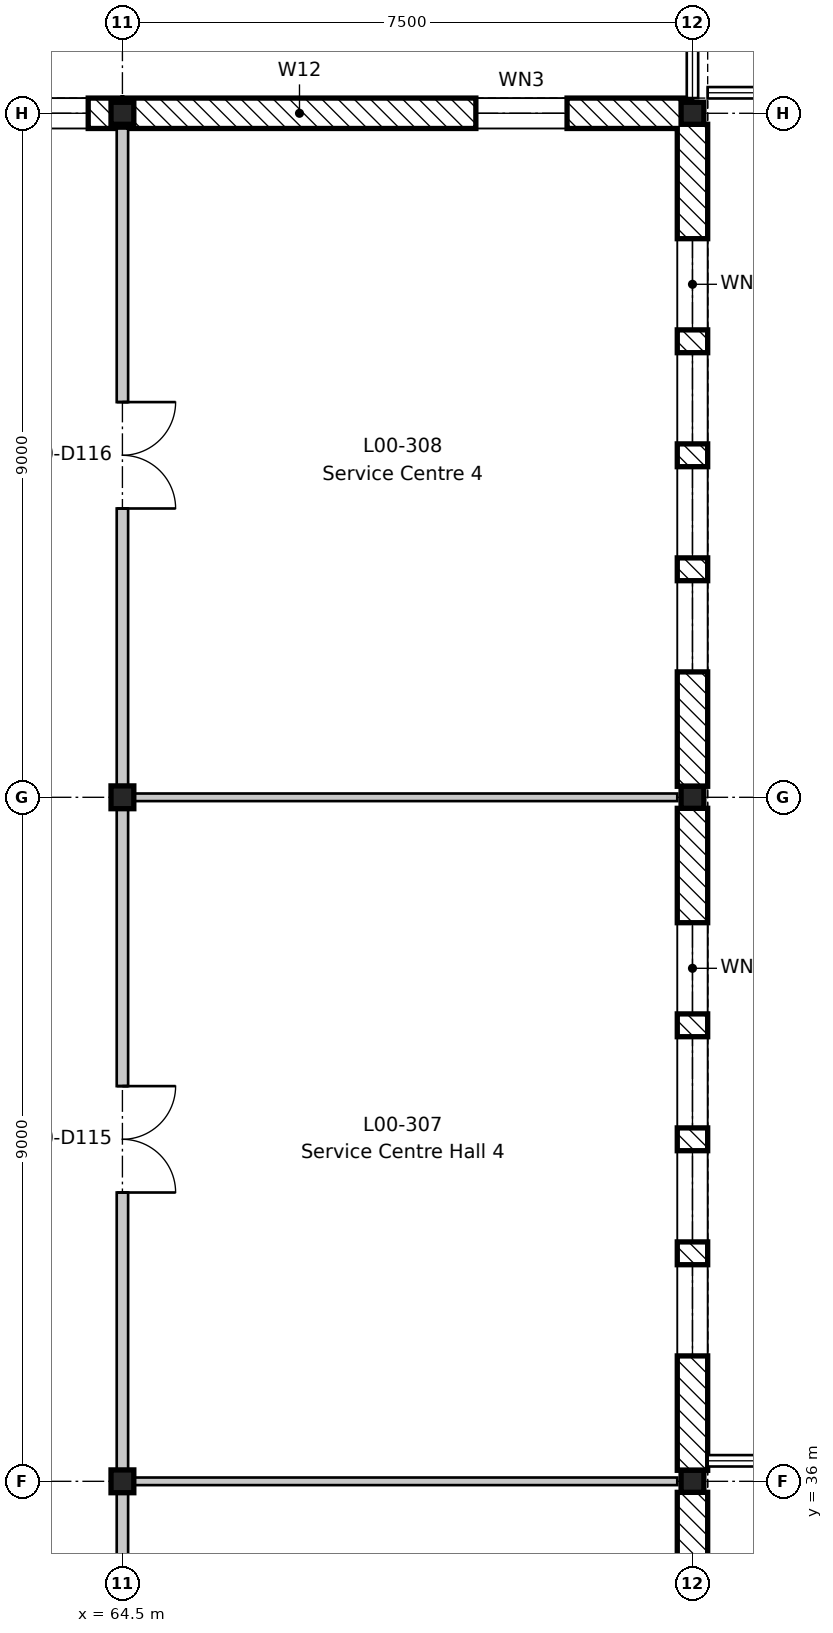
"""IFC4 building model, lengths in metres.
Left out: names, types, materials, properties, quantities, classifications, styles, units other than length and angle.
Written with IfcOpenShell. Run it as: python <this file> out.ifc"""

import sys

from ifc_helpers import new_model, si_unit, direction, frame, frame_2d, origin, origin_2d, place, context, subcontext, project, spatial, rectangle, i_section, extrude, element, fill, save


model = new_model("IFC4")
c1 = context("Model", 3, precision=1e-05, world=origin(), true_north=direction((0.0, 1.0)))
c2 = subcontext(c1, "Body", "Model", "MODEL_VIEW")
j1 = project(units=[si_unit("LENGTHUNIT", "METRE"), si_unit("PLANEANGLEUNIT", "RADIAN")], contexts=[c1])
p1 = place(None, origin())
s1 = spatial("IfcSite", under=j1, at=p1, CompositionType="ELEMENT")
p2 = place(p1, origin())
s2 = spatial("IfcBuilding", under=s1, at=p2, CompositionType="ELEMENT")
p3 = place(p2, origin())
s3 = spatial("IfcBuildingStorey", under=s2, at=p3, CompositionType="ELEMENT", Elevation=0.0)
for number, where, z_axis, x_axis in (
    (1, (64.5, 36.0, -0.6), (0.0, 0.0, 1.0), (1.0, 0.0, 0.0)),
    (2, (64.5, 45.0, -0.6), (0.0, 0.0, 1.0), (1.0, 0.0, 0.0)),
):
    element("IfcColumn", number, at=place(p3, frame(where, z_axis=z_axis, x_axis=x_axis)), inside=s3, PredefinedType="COLUMN", context=c2, shape_type="SweptSolid", body=[
        extrude(i_section(OverallWidth=0.3, OverallDepth=0.3, WebThickness=0.011, FlangeThickness=0.019, FilletRadius=0.027, at=origin_2d()), origin(), (0.0, 0.0, 1.0), 5.8),
    ])
for number, where, z_axis, x_axis in (
    (3, (64.5, 54.0, -0.6), (0.0, 0.0, 1.0), (1.0, 0.0, 0.0)),
    (4, (72.0, 36.0, -0.6), (0.0, 0.0, 1.0), (1.0, 0.0, 0.0)),
    (5, (72.0, 45.0, -0.6), (0.0, 0.0, 1.0), (1.0, 0.0, 0.0)),
    (6, (72.0, 54.0, -0.6), (0.0, 0.0, 1.0), (1.0, 0.0, 0.0)),
):
    element("IfcColumn", number, at=place(p3, frame(where, z_axis=z_axis, x_axis=x_axis)), inside=s3, PredefinedType="COLUMN", context=c2, shape_type="SweptSolid", body=[
        extrude(i_section(OverallWidth=0.3, OverallDepth=0.29, WebThickness=0.009, FlangeThickness=0.014, FilletRadius=0.027, at=origin_2d()), origin(), (0.0, 0.0, 1.0), 5.8),
    ])
p4 = place(p3, frame((61.509, 54.0, 0.0), z_axis=(0.0, 0.0, 1.0), x_axis=(1.0, 0.0, 0.0)))
e7 = element("IfcWall", 7, at=p4, inside=s3, PredefinedType="STANDARD", context=c2, shape_type="SweptSolid", body=[
    extrude(rectangle(XDim=2.981, YDim=0.4, at=frame_2d((1.491, 0.0))), origin(), (0.0, 0.0, 1.0), 5.0),
])
p5 = place(p4, frame((0.441, 0.0, 0.9)))
e8 = element("IfcOpeningElement", 8, at=p5, cuts=e7, PredefinedType="OPENING", context=c2, shape_type="SweptSolid", body=[
    extrude(rectangle(XDim=2.1, YDim=2.1, at=frame_2d((1.05, 1.05))), frame((0.0, 0.21, 0.0), z_axis=(0.0, -1.0, 0.0), x_axis=(1.0, 0.0, 0.0)), (0.0, 0.0, 1.0), 0.42),
])
p6 = place(p3, frame((64.509, 54.0, 0.0), z_axis=(0.0, 0.0, 1.0), x_axis=(1.0, 0.0, 0.0)))
e9 = element("IfcWall", 9, at=p6, inside=s3, PredefinedType="STANDARD", context=c2, shape_type="SweptSolid", body=[
    extrude(rectangle(XDim=7.481, YDim=0.4, at=frame_2d((3.741, 0.0))), origin(), (0.0, 0.0, 1.0), 4.87),
])
p7 = place(p6, frame((4.641, 0.0, 0.6)))
e10 = element("IfcOpeningElement", 10, at=p7, cuts=e9, PredefinedType="OPENING", context=c2, shape_type="SweptSolid", body=[
    extrude(rectangle(XDim=1.2, YDim=3.9, at=frame_2d((0.6, 1.95))), frame((0.0, 0.21, 0.0), z_axis=(0.0, -1.0, 0.0), x_axis=(1.0, 0.0, 0.0)), (0.0, 0.0, 1.0), 0.42),
])
p8 = place(p3, frame((72.0, 35.855, 0.0), z_axis=(0.0, 0.0, 1.0), x_axis=(0.0, -1.0, 0.0)))
e11 = element("IfcWall", 11, at=p8, inside=s3, PredefinedType="STANDARD", context=c2, shape_type="SweptSolid", body=[
    extrude(rectangle(XDim=8.71, YDim=0.4, at=frame_2d((4.355, 0.0))), origin(), (0.0, 0.0, 1.0), 4.8),
])
p9 = place(p8, frame((6.005, 0.0, 0.6)))
e12 = element("IfcOpeningElement", 12, at=p9, cuts=e11, PredefinedType="OPENING", context=c2, shape_type="SweptSolid", body=[
    extrude(rectangle(XDim=1.2, YDim=3.9, at=frame_2d((0.6, 1.95))), frame((0.0, 0.21, 0.0), z_axis=(0.0, -1.0, 0.0), x_axis=(1.0, 0.0, 0.0)), (0.0, 0.0, 1.0), 0.42),
])
p10 = place(p8, frame((4.505, 0.0, 0.6)))
e13 = element("IfcOpeningElement", 13, at=p10, cuts=e11, PredefinedType="OPENING", context=c2, shape_type="SweptSolid", body=[
    extrude(rectangle(XDim=1.2, YDim=3.9, at=frame_2d((0.6, 1.95))), frame((0.0, 0.21, 0.0), z_axis=(0.0, -1.0, 0.0), x_axis=(1.0, 0.0, 0.0)), (0.0, 0.0, 1.0), 0.42),
])
p11 = place(p8, frame((3.005, 0.0, 0.6)))
e14 = element("IfcOpeningElement", 14, at=p11, cuts=e11, PredefinedType="OPENING", context=c2, shape_type="SweptSolid", body=[
    extrude(rectangle(XDim=1.2, YDim=3.9, at=frame_2d((0.6, 1.95))), frame((0.0, 0.21, 0.0), z_axis=(0.0, -1.0, 0.0), x_axis=(1.0, 0.0, 0.0)), (0.0, 0.0, 1.0), 0.42),
])
p12 = place(p8, frame((1.505, 0.0, 0.6)))
e15 = element("IfcOpeningElement", 15, at=p12, cuts=e11, PredefinedType="OPENING", context=c2, shape_type="SweptSolid", body=[
    extrude(rectangle(XDim=1.2, YDim=3.9, at=frame_2d((0.6, 1.95))), frame((0.0, 0.21, 0.0), z_axis=(0.0, -1.0, 0.0), x_axis=(1.0, 0.0, 0.0)), (0.0, 0.0, 1.0), 0.42),
])
p13 = place(p3, frame((72.0, 44.855, 0.0), z_axis=(0.0, 0.0, 1.0), x_axis=(0.0, -1.0, 0.0)))
e16 = element("IfcWall", 16, at=p13, inside=s3, PredefinedType="STANDARD", context=c2, shape_type="SweptSolid", body=[
    extrude(rectangle(XDim=8.71, YDim=0.4, at=frame_2d((4.355, 0.0))), origin(), (0.0, 0.0, 1.0), 4.8),
])
p14 = place(p13, frame((6.005, 0.0, 0.6)))
e17 = element("IfcOpeningElement", 17, at=p14, cuts=e16, PredefinedType="OPENING", context=c2, shape_type="SweptSolid", body=[
    extrude(rectangle(XDim=1.2, YDim=3.9, at=frame_2d((0.6, 1.95))), frame((0.0, 0.21, 0.0), z_axis=(0.0, -1.0, 0.0), x_axis=(1.0, 0.0, 0.0)), (0.0, 0.0, 1.0), 0.42),
])
p15 = place(p13, frame((4.505, 0.0, 0.6)))
e18 = element("IfcOpeningElement", 18, at=p15, cuts=e16, PredefinedType="OPENING", context=c2, shape_type="SweptSolid", body=[
    extrude(rectangle(XDim=1.2, YDim=3.9, at=frame_2d((0.6, 1.95))), frame((0.0, 0.21, 0.0), z_axis=(0.0, -1.0, 0.0), x_axis=(1.0, 0.0, 0.0)), (0.0, 0.0, 1.0), 0.42),
])
p16 = place(p13, frame((3.005, 0.0, 0.6)))
e19 = element("IfcOpeningElement", 19, at=p16, cuts=e16, PredefinedType="OPENING", context=c2, shape_type="SweptSolid", body=[
    extrude(rectangle(XDim=1.2, YDim=3.9, at=frame_2d((0.6, 1.95))), frame((0.0, 0.21, 0.0), z_axis=(0.0, -1.0, 0.0), x_axis=(1.0, 0.0, 0.0)), (0.0, 0.0, 1.0), 0.42),
])
p17 = place(p13, frame((1.505, 0.0, 0.6)))
e20 = element("IfcOpeningElement", 20, at=p17, cuts=e16, PredefinedType="OPENING", context=c2, shape_type="SweptSolid", body=[
    extrude(rectangle(XDim=1.2, YDim=3.9, at=frame_2d((0.6, 1.95))), frame((0.0, 0.21, 0.0), z_axis=(0.0, -1.0, 0.0), x_axis=(1.0, 0.0, 0.0)), (0.0, 0.0, 1.0), 0.42),
])
p18 = place(p3, frame((72.0, 53.855, 0.0), z_axis=(0.0, 0.0, 1.0), x_axis=(0.0, -1.0, 0.0)))
e21 = element("IfcWall", 21, at=p18, inside=s3, PredefinedType="STANDARD", context=c2, shape_type="SweptSolid", body=[
    extrude(rectangle(XDim=8.71, YDim=0.4, at=frame_2d((4.355, 0.0))), origin(), (0.0, 0.0, 1.0), 4.8),
])
p19 = place(p18, frame((6.005, 0.0, 0.6)))
e22 = element("IfcOpeningElement", 22, at=p19, cuts=e21, PredefinedType="OPENING", context=c2, shape_type="SweptSolid", body=[
    extrude(rectangle(XDim=1.2, YDim=3.9, at=frame_2d((0.6, 1.95))), frame((0.0, 0.21, 0.0), z_axis=(0.0, -1.0, 0.0), x_axis=(1.0, 0.0, 0.0)), (0.0, 0.0, 1.0), 0.42),
])
p20 = place(p18, frame((4.505, 0.0, 0.6)))
e23 = element("IfcOpeningElement", 23, at=p20, cuts=e21, PredefinedType="OPENING", context=c2, shape_type="SweptSolid", body=[
    extrude(rectangle(XDim=1.2, YDim=3.9, at=frame_2d((0.6, 1.95))), frame((0.0, 0.21, 0.0), z_axis=(0.0, -1.0, 0.0), x_axis=(1.0, 0.0, 0.0)), (0.0, 0.0, 1.0), 0.42),
])
p21 = place(p18, frame((3.005, 0.0, 0.6)))
e24 = element("IfcOpeningElement", 24, at=p21, cuts=e21, PredefinedType="OPENING", context=c2, shape_type="SweptSolid", body=[
    extrude(rectangle(XDim=1.2, YDim=3.9, at=frame_2d((0.6, 1.95))), frame((0.0, 0.21, 0.0), z_axis=(0.0, -1.0, 0.0), x_axis=(1.0, 0.0, 0.0)), (0.0, 0.0, 1.0), 0.42),
])
p22 = place(p18, frame((1.505, 0.0, 0.6)))
e25 = element("IfcOpeningElement", 25, at=p22, cuts=e21, PredefinedType="OPENING", context=c2, shape_type="SweptSolid", body=[
    extrude(rectangle(XDim=1.2, YDim=3.9, at=frame_2d((0.6, 1.95))), frame((0.0, 0.21, 0.0), z_axis=(0.0, -1.0, 0.0), x_axis=(1.0, 0.0, 0.0)), (0.0, 0.0, 1.0), 0.42),
])
for number, where, z_axis, x_axis in (
    (26, (64.575, 36.0, 0.0), (0.0, 0.0, 1.0), (1.0, 0.0, 0.0)),
    (27, (64.575, 45.0, 0.0), (0.0, 0.0, 1.0), (1.0, 0.0, 0.0)),
):
    element("IfcWall", number, at=place(p3, frame(where, z_axis=z_axis, x_axis=x_axis)), inside=s3, PredefinedType="PARTITIONING", context=c2, shape_type="SweptSolid", body=[
        extrude(rectangle(XDim=7.225, YDim=0.1, at=frame_2d((3.613, 0.0))), origin(), (0.0, 0.0, 1.0), 4.85),
    ])
p23 = place(p3, frame((64.5, 9.0, 0.0), z_axis=(0.0, 0.0, 1.0), x_axis=(0.0, 1.0, 0.0)))
e28 = element("IfcWall", 28, at=p23, inside=s3, PredefinedType="PARTITIONING", context=c2, shape_type="SweptSolid", body=[
    extrude(rectangle(XDim=44.8, YDim=0.15, at=frame_2d((22.4, 0.0))), origin(), (0.0, 0.0, 1.0), 4.68),
])
p24 = place(p23, frame((3.8, 0.0, 0.0)))
e29 = element("IfcOpeningElement", 29, at=p24, cuts=e28, PredefinedType="OPENING", context=c2, shape_type="SweptSolid", body=[
    extrude(rectangle(XDim=1.4, YDim=2.1, at=frame_2d((0.7, 1.05))), frame((0.0, 0.085, 0.0), z_axis=(0.0, -1.0, 0.0), x_axis=(1.0, 0.0, 0.0)), (0.0, 0.0, 1.0), 0.17),
])
p25 = place(p23, frame((12.8, 0.0, 0.0)))
e30 = element("IfcOpeningElement", 30, at=p25, cuts=e28, PredefinedType="OPENING", context=c2, shape_type="SweptSolid", body=[
    extrude(rectangle(XDim=1.4, YDim=2.1, at=frame_2d((0.7, 1.05))), frame((0.0, 0.085, 0.0), z_axis=(0.0, -1.0, 0.0), x_axis=(1.0, 0.0, 0.0)), (0.0, 0.0, 1.0), 0.17),
])
p26 = place(p23, frame((21.8, 0.0, 0.0)))
e31 = element("IfcOpeningElement", 31, at=p26, cuts=e28, PredefinedType="OPENING", context=c2, shape_type="SweptSolid", body=[
    extrude(rectangle(XDim=1.4, YDim=2.1, at=frame_2d((0.7, 1.05))), frame((0.0, 0.085, 0.0), z_axis=(0.0, -1.0, 0.0), x_axis=(1.0, 0.0, 0.0)), (0.0, 0.0, 1.0), 0.17),
])
p27 = place(p23, frame((30.8, 0.0, 0.0)))
e32 = element("IfcOpeningElement", 32, at=p27, cuts=e28, PredefinedType="OPENING", context=c2, shape_type="SweptSolid", body=[
    extrude(rectangle(XDim=1.4, YDim=2.1, at=frame_2d((0.7, 1.05))), frame((0.0, 0.085, 0.0), z_axis=(0.0, -1.0, 0.0), x_axis=(1.0, 0.0, 0.0)), (0.0, 0.0, 1.0), 0.17),
])
p28 = place(p23, frame((39.8, 0.0, 0.0)))
e33 = element("IfcOpeningElement", 33, at=p28, cuts=e28, PredefinedType="OPENING", context=c2, shape_type="SweptSolid", body=[
    extrude(rectangle(XDim=1.4, YDim=2.1, at=frame_2d((0.7, 1.05))), frame((0.0, 0.085, 0.0), z_axis=(0.0, -1.0, 0.0), x_axis=(1.0, 0.0, 0.0)), (0.0, 0.0, 1.0), 0.17),
])
p29 = place(p5, origin())
e34 = element("IfcWindow", 34, at=p29, inside=s3, PartitioningType="SINGLE_PANEL", PredefinedType="WINDOW", context=c2, shape_type="SweptSolid", body=[
    extrude(rectangle(XDim=2.1, YDim=2.1, at=frame_2d((1.05, 1.05))), frame((0.0, 0.03, 0.0), z_axis=(0.0, -1.0, 0.0), x_axis=(1.0, 0.0, 0.0)), (0.0, 0.0, 1.0), 0.06),
])
fill(e8, e34)
p30 = place(p7, origin())
e35 = element("IfcWindow", 35, at=p30, inside=s3, PartitioningType="SINGLE_PANEL", PredefinedType="WINDOW", context=c2, shape_type="SweptSolid", body=[
    extrude(rectangle(XDim=1.2, YDim=3.9, at=frame_2d((0.6, 1.95))), frame((0.0, 0.03, 0.0), z_axis=(0.0, -1.0, 0.0), x_axis=(1.0, 0.0, 0.0)), (0.0, 0.0, 1.0), 0.06),
])
fill(e10, e35)
p31 = place(p14, origin())
e36 = element("IfcWindow", 36, at=p31, inside=s3, PartitioningType="SINGLE_PANEL", PredefinedType="WINDOW", context=c2, shape_type="SweptSolid", body=[
    extrude(rectangle(XDim=1.2, YDim=3.9, at=frame_2d((0.6, 1.95))), frame((0.0, 0.03, 0.0), z_axis=(0.0, -1.0, 0.0), x_axis=(1.0, 0.0, 0.0)), (0.0, 0.0, 1.0), 0.06),
])
fill(e17, e36)
p32 = place(p15, origin())
e37 = element("IfcWindow", 37, at=p32, inside=s3, PartitioningType="SINGLE_PANEL", PredefinedType="WINDOW", context=c2, shape_type="SweptSolid", body=[
    extrude(rectangle(XDim=1.2, YDim=3.9, at=frame_2d((0.6, 1.95))), frame((0.0, 0.03, 0.0), z_axis=(0.0, -1.0, 0.0), x_axis=(1.0, 0.0, 0.0)), (0.0, 0.0, 1.0), 0.06),
])
fill(e18, e37)
p33 = place(p16, origin())
e38 = element("IfcWindow", 38, at=p33, inside=s3, PartitioningType="SINGLE_PANEL", PredefinedType="WINDOW", context=c2, shape_type="SweptSolid", body=[
    extrude(rectangle(XDim=1.2, YDim=3.9, at=frame_2d((0.6, 1.95))), frame((0.0, 0.03, 0.0), z_axis=(0.0, -1.0, 0.0), x_axis=(1.0, 0.0, 0.0)), (0.0, 0.0, 1.0), 0.06),
])
fill(e19, e38)
p34 = place(p17, origin())
e39 = element("IfcWindow", 39, at=p34, inside=s3, PartitioningType="SINGLE_PANEL", PredefinedType="WINDOW", context=c2, shape_type="SweptSolid", body=[
    extrude(rectangle(XDim=1.2, YDim=3.9, at=frame_2d((0.6, 1.95))), frame((0.0, 0.03, 0.0), z_axis=(0.0, -1.0, 0.0), x_axis=(1.0, 0.0, 0.0)), (0.0, 0.0, 1.0), 0.06),
])
fill(e20, e39)
p35 = place(p19, origin())
e40 = element("IfcWindow", 40, at=p35, inside=s3, PartitioningType="SINGLE_PANEL", PredefinedType="WINDOW", context=c2, shape_type="SweptSolid", body=[
    extrude(rectangle(XDim=1.2, YDim=3.9, at=frame_2d((0.6, 1.95))), frame((0.0, 0.03, 0.0), z_axis=(0.0, -1.0, 0.0), x_axis=(1.0, 0.0, 0.0)), (0.0, 0.0, 1.0), 0.06),
])
fill(e22, e40)
p36 = place(p20, origin())
e41 = element("IfcWindow", 41, at=p36, inside=s3, PartitioningType="SINGLE_PANEL", PredefinedType="WINDOW", context=c2, shape_type="SweptSolid", body=[
    extrude(rectangle(XDim=1.2, YDim=3.9, at=frame_2d((0.6, 1.95))), frame((0.0, 0.03, 0.0), z_axis=(0.0, -1.0, 0.0), x_axis=(1.0, 0.0, 0.0)), (0.0, 0.0, 1.0), 0.06),
])
fill(e23, e41)
p37 = place(p21, origin())
e42 = element("IfcWindow", 42, at=p37, inside=s3, PartitioningType="SINGLE_PANEL", PredefinedType="WINDOW", context=c2, shape_type="SweptSolid", body=[
    extrude(rectangle(XDim=1.2, YDim=3.9, at=frame_2d((0.6, 1.95))), frame((0.0, 0.03, 0.0), z_axis=(0.0, -1.0, 0.0), x_axis=(1.0, 0.0, 0.0)), (0.0, 0.0, 1.0), 0.06),
])
fill(e24, e42)
p38 = place(p22, origin())
e43 = element("IfcWindow", 43, at=p38, inside=s3, PartitioningType="SINGLE_PANEL", PredefinedType="WINDOW", context=c2, shape_type="SweptSolid", body=[
    extrude(rectangle(XDim=1.2, YDim=3.9, at=frame_2d((0.6, 1.95))), frame((0.0, 0.03, 0.0), z_axis=(0.0, -1.0, 0.0), x_axis=(1.0, 0.0, 0.0)), (0.0, 0.0, 1.0), 0.06),
])
fill(e25, e43)
p39 = place(p27, frame((1.4, 0.0, 0.0), z_axis=(0.0, 0.0, 1.0), x_axis=(-1.0, 0.0, 0.0)))
e44 = element("IfcDoor", 44, at=p39, inside=s3, OperationType="DOUBLE_DOOR_SINGLE_SWING", PredefinedType="DOOR", context=c2, shape_type="SweptSolid", body=[
    extrude(rectangle(XDim=1.4, YDim=2.1, at=frame_2d((0.7, 1.05))), frame((0.0, 0.025, 0.0), z_axis=(0.0, -1.0, 0.0), x_axis=(1.0, 0.0, 0.0)), (0.0, 0.0, 1.0), 0.05),
])
fill(e32, e44)
p40 = place(p28, frame((1.4, 0.0, 0.0), z_axis=(0.0, 0.0, 1.0), x_axis=(-1.0, 0.0, 0.0)))
e45 = element("IfcDoor", 45, at=p40, inside=s3, OperationType="DOUBLE_DOOR_SINGLE_SWING", PredefinedType="DOOR", context=c2, shape_type="SweptSolid", body=[
    extrude(rectangle(XDim=1.4, YDim=2.1, at=frame_2d((0.7, 1.05))), frame((0.0, 0.025, 0.0), z_axis=(0.0, -1.0, 0.0), x_axis=(1.0, 0.0, 0.0)), (0.0, 0.0, 1.0), 0.05),
])
fill(e33, e45)
save(model, sys.argv[1])
